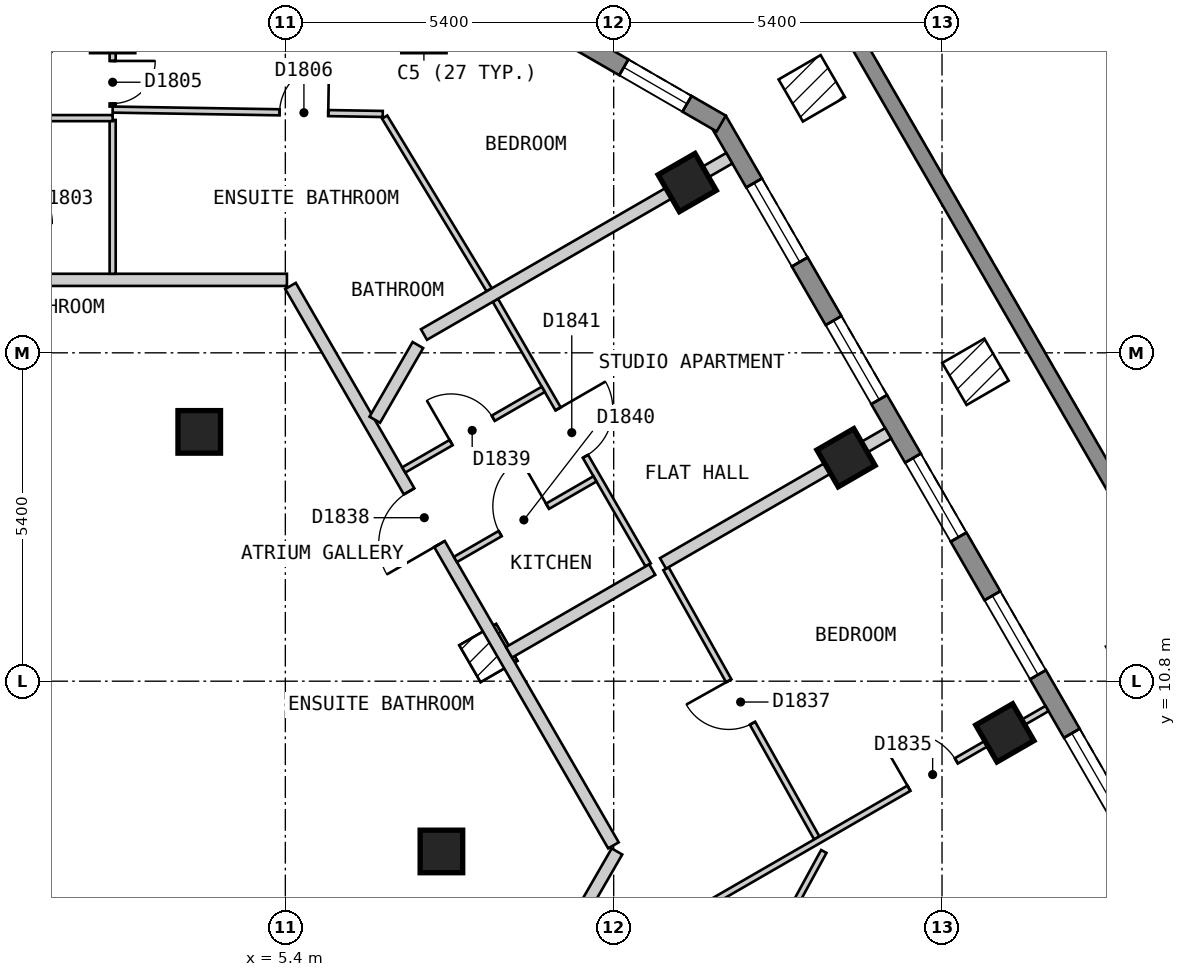
"""IFC4 building model, lengths in metres.
Left out: names, types, materials, properties, quantities, classifications, styles, units other than length and angle.
Written with IfcOpenShell. Run it as: python <this file> out.ifc"""

import sys

from ifc_helpers import new_model, si_unit, direction, frame, frame_2d, origin, origin_2d, place, context, subcontext, project, spatial, polyline, rectangle, outline, extrude, element, fill, save


model = new_model("IFC4")
c1 = context("Model", 3, precision=1e-05, world=origin(), true_north=direction((0.0, 1.0)))
c2 = subcontext(c1, "Body", "Model", "MODEL_VIEW")
j1 = project(units=[si_unit("LENGTHUNIT", "METRE"), si_unit("PLANEANGLEUNIT", "RADIAN")], contexts=[c1])
p1 = place(None, origin())
s1 = spatial("IfcSite", under=j1, at=p1, CompositionType="ELEMENT")
p2 = place(p1, origin())
s2 = spatial("IfcBuilding", under=s1, at=p2, CompositionType="ELEMENT")
p3 = place(p2, frame((0.0, 0.0, 202.8)))
s3 = spatial("IfcBuildingStorey", under=s2, at=p3, CompositionType="ELEMENT", Elevation=202.8)
for number, where, z_axis, x_axis in (
    (1, (17.233, 9.95, 0.0), (0.0, 0.0, 1.0), (-0.5, 0.866, 0.0)),
    (2, (14.621, 14.475, 0.0), (0.0, 0.0, 1.0), (-0.5, 0.866, 0.0)),
    (3, (12.009, 19.0, 0.0), (0.0, 0.0, 1.0), (-0.5, 0.866, 0.0)),
    (4, (7.967, 8.0, 0.0), (0.0, 0.0, 1.0), (1.0, 0.0, 0.0)),
    (5, (3.984, 14.9, 0.0), (0.0, 0.0, 1.0), (1.0, 0.0, 0.0)),
):
    element("IfcColumn", number, at=place(p3, frame(where, z_axis=z_axis, x_axis=x_axis)), inside=s3, PredefinedType="COLUMN", context=c2, shape_type="SweptSolid", body=[
        extrude(rectangle(XDim=0.7, YDim=0.7, at=origin_2d()), origin(), (0.0, 0.0, 1.0), 3.0),
    ])
p4 = place(p3, frame((23.599, 0.825, 0.0), z_axis=(0.0, 0.0, 1.0), x_axis=(-0.500003656944, 0.866023292436, 0.0)))
e6 = element("IfcWall", 6, at=p4, inside=s3, PredefinedType="SOLIDWALL", context=c2, shape_type="SweptSolid", body=[
    extrude(outline(polyline([(0.0, -0.15), (22.17, -0.15), (22.09, 0.15), (0.08, 0.15), (0.0, -0.15)])), origin(), (0.0, 0.0, 1.0), 2.7),
])
p5 = place(p4, frame((1.191, 0.0, 0.15)))
e7 = element("IfcOpeningElement", 7, at=p5, cuts=e6, PredefinedType="OPENING", context=c2, shape_type="SweptSolid", body=[
    extrude(rectangle(XDim=1.5, YDim=2.1, at=frame_2d((0.75, 1.05))), frame((0.0, 0.16, 0.0), z_axis=(0.0, -1.0, 0.0), x_axis=(1.0, 0.0, 0.0)), (0.0, 0.0, 1.0), 0.32),
])
p6 = place(p4, frame((3.804, 0.0, 0.15)))
e8 = element("IfcOpeningElement", 8, at=p6, cuts=e6, PredefinedType="OPENING", context=c2, shape_type="SweptSolid", body=[
    extrude(rectangle(XDim=1.5, YDim=2.1, at=frame_2d((0.75, 1.05))), frame((0.0, 0.16, 0.0), z_axis=(0.0, -1.0, 0.0), x_axis=(1.0, 0.0, 0.0)), (0.0, 0.0, 1.0), 0.32),
])
p7 = place(p4, frame((6.417, 0.0, 0.15)))
e9 = element("IfcOpeningElement", 9, at=p7, cuts=e6, PredefinedType="OPENING", context=c2, shape_type="SweptSolid", body=[
    extrude(rectangle(XDim=1.5, YDim=2.1, at=frame_2d((0.75, 1.05))), frame((0.0, 0.16, 0.0), z_axis=(0.0, -1.0, 0.0), x_axis=(1.0, 0.0, 0.0)), (0.0, 0.0, 1.0), 0.32),
])
p8 = place(p4, frame((9.029, 0.0, 0.15)))
e10 = element("IfcOpeningElement", 10, at=p8, cuts=e6, PredefinedType="OPENING", context=c2, shape_type="SweptSolid", body=[
    extrude(rectangle(XDim=1.5, YDim=2.1, at=frame_2d((0.75, 1.05))), frame((0.0, 0.16, 0.0), z_axis=(0.0, -1.0, 0.0), x_axis=(1.0, 0.0, 0.0)), (0.0, 0.0, 1.0), 0.32),
])
p9 = place(p4, frame((11.641, 0.0, 0.15)))
e11 = element("IfcOpeningElement", 11, at=p9, cuts=e6, PredefinedType="OPENING", context=c2, shape_type="SweptSolid", body=[
    extrude(rectangle(XDim=1.5, YDim=2.1, at=frame_2d((0.75, 1.05))), frame((0.0, 0.16, 0.0), z_axis=(0.0, -1.0, 0.0), x_axis=(1.0, 0.0, 0.0)), (0.0, 0.0, 1.0), 0.32),
])
p10 = place(p4, frame((14.254, 0.0, 0.15)))
e12 = element("IfcOpeningElement", 12, at=p10, cuts=e6, PredefinedType="OPENING", context=c2, shape_type="SweptSolid", body=[
    extrude(rectangle(XDim=1.5, YDim=2.1, at=frame_2d((0.75, 1.05))), frame((0.0, 0.16, 0.0), z_axis=(0.0, -1.0, 0.0), x_axis=(1.0, 0.0, 0.0)), (0.0, 0.0, 1.0), 0.32),
])
p11 = place(p4, frame((16.866, 0.0, 0.15)))
e13 = element("IfcOpeningElement", 13, at=p11, cuts=e6, PredefinedType="OPENING", context=c2, shape_type="SweptSolid", body=[
    extrude(rectangle(XDim=1.5, YDim=2.1, at=frame_2d((0.75, 1.05))), frame((0.0, 0.16, 0.0), z_axis=(0.0, -1.0, 0.0), x_axis=(1.0, 0.0, 0.0)), (0.0, 0.0, 1.0), 0.32),
])
p12 = place(p4, frame((19.479, 0.0, 0.15)))
e14 = element("IfcOpeningElement", 14, at=p12, cuts=e6, PredefinedType="OPENING", context=c2, shape_type="SweptSolid", body=[
    extrude(rectangle(XDim=1.5, YDim=2.1, at=frame_2d((0.75, 1.05))), frame((0.0, 0.16, 0.0), z_axis=(0.0, -1.0, 0.0), x_axis=(1.0, 0.0, 0.0)), (0.0, 0.0, 1.0), 0.32),
])
p13 = place(p3, frame((12.569, 19.97, 0.0), z_axis=(0.0, 0.0, 1.0), x_axis=(-0.866022959057, 0.500004234368, 0.0)))
e15 = element("IfcWall", 15, at=p13, inside=s3, PredefinedType="SOLIDWALL", context=c2, shape_type="SweptSolid", body=[
    extrude(outline(polyline([(0.0, -0.15), (5.0, -0.15), (4.92, 0.15), (0.08, 0.15), (0.0, -0.15)])), origin(), (0.0, 0.0, 1.0), 2.7),
])
p14 = place(p13, frame((0.65, 0.0, 0.15)))
e16 = element("IfcOpeningElement", 16, at=p14, cuts=e15, PredefinedType="OPENING", context=c2, shape_type="SweptSolid", body=[
    extrude(rectangle(XDim=1.2, YDim=2.1, at=frame_2d((0.6, 1.05))), frame((0.0, 0.16, 0.0), z_axis=(0.0, -1.0, 0.0), x_axis=(1.0, 0.0, 0.0)), (0.0, 0.0, 1.0), 0.32),
])
p15 = place(p13, frame((3.15, 0.0, 0.15)))
e17 = element("IfcOpeningElement", 17, at=p15, cuts=e15, PredefinedType="OPENING", context=c2, shape_type="SweptSolid", body=[
    extrude(rectangle(XDim=1.2, YDim=2.1, at=frame_2d((0.6, 1.05))), frame((0.0, 0.16, 0.0), z_axis=(0.0, -1.0, 0.0), x_axis=(1.0, 0.0, 0.0)), (0.0, 0.0, 1.0), 0.32),
])
p16 = place(p3, frame((14.613, 21.637, 0.0), z_axis=(0.0, 0.0, 1.0), x_axis=(0.500061067893, -0.865990143349, 0.0)))
e18 = element("IfcWall", 18, at=p16, inside=s3, PredefinedType="PARAPET", context=c2, shape_type="SweptSolid", body=[
    extrude(outline(polyline([(0.067, -0.125), (22.796, -0.125), (22.863, 0.125), (0.0, 0.125), (0.067, -0.125)])), origin(), (0.0, 0.0, 1.0), 1.6),
])
p17 = place(p3, frame((5.485, 17.3, 0.0), z_axis=(0.0, 0.0, 1.0), x_axis=(0.499943285704, -0.866058145322, 0.0)))
e19 = element("IfcWall", 19, at=p17, inside=s3, PredefinedType="PARTITIONING", context=c2, shape_type="SweptSolid", body=[
    extrude(rectangle(XDim=10.623, YDim=0.2, at=frame_2d((5.312, 0.0))), origin(), (0.0, 0.0, 1.0), 2.7),
])
p18 = place(p17, frame((3.901, 0.0, 0.0)))
e20 = element("IfcOpeningElement", 20, at=p18, cuts=e19, PredefinedType="OPENING", context=c2, shape_type="SweptSolid", body=[
    extrude(rectangle(XDim=1.0, YDim=2.1, at=frame_2d((0.5, 1.05))), frame((0.0, 0.11, 0.0), z_axis=(0.0, -1.0, 0.0), x_axis=(1.0, 0.0, 0.0)), (0.0, 0.0, 1.0), 0.22),
])
p19 = place(p3, frame((-5.311, 17.4, 0.0), z_axis=(0.0, 0.0, 1.0), x_axis=(1.0, 0.0, 0.0)))
e21 = element("IfcWall", 21, at=p19, inside=s3, PredefinedType="PARTITIONING", context=c2, shape_type="SweptSolid", body=[
    extrude(rectangle(XDim=10.737, YDim=0.2, at=frame_2d((5.369, 0.0))), origin(), (0.0, 0.0, 1.0), 2.7),
])
p20 = place(p19, frame((4.812, 0.0, 0.0)))
e22 = element("IfcOpeningElement", 22, at=p20, cuts=e21, PredefinedType="OPENING", context=c2, shape_type="SweptSolid", body=[
    extrude(rectangle(XDim=1.0, YDim=2.1, at=frame_2d((0.5, 1.05))), frame((0.0, 0.11, 0.0), z_axis=(0.0, -1.0, 0.0), x_axis=(1.0, 0.0, 0.0)), (0.0, 0.0, 1.0), 0.22),
])
p21 = place(p3, frame((9.404, 5.487, 0.0), z_axis=(0.0, 0.0, 1.0), x_axis=(0.499768590677, 0.866158966803, 0.0)))
e23 = element("IfcWall", 23, at=p21, inside=s3, PredefinedType="PARTITIONING", context=c2, shape_type="SweptSolid", body=[
    extrude(rectangle(XDim=2.901, YDim=0.2, at=frame_2d((1.451, 0.0))), origin(), (0.0, 0.0, 1.0), 2.7),
])
p22 = place(p3, frame((7.033, 20.077, 0.0), z_axis=(0.0, 0.0, 1.0), x_axis=(0.517918779664, -0.855429797044, 0.0)))
e24 = element("IfcWall", 24, at=p22, inside=s3, PredefinedType="PARTITIONING", context=c2, shape_type="SweptSolid", body=[
    extrude(rectangle(XDim=3.321, YDim=0.1, at=frame_2d((1.661, 0.0))), origin(), (0.0, 0.0, 1.0), 2.7),
])
p23 = place(p3, frame((8.854, 17.064, 0.0), z_axis=(0.0, 0.0, 1.0), x_axis=(0.500042049778, -0.866001124973, 0.0)))
e25 = element("IfcWall", 25, at=p23, inside=s3, PredefinedType="PARTITIONING", context=c2, shape_type="SweptSolid", body=[
    extrude(rectangle(XDim=5.025, YDim=0.1, at=frame_2d((2.513, 0.0))), origin(), (0.0, 0.0, 1.0), 2.7),
])
p24 = place(p23, frame((2.063, 0.0, 0.0)))
e26 = element("IfcOpeningElement", 26, at=p24, cuts=e25, PredefinedType="OPENING", context=c2, shape_type="SweptSolid", body=[
    extrude(rectangle(XDim=0.9, YDim=2.1, at=frame_2d((0.45, 1.05))), frame((0.0, 0.06, 0.0), z_axis=(0.0, -1.0, 0.0), x_axis=(1.0, 0.0, 0.0)), (0.0, 0.0, 1.0), 0.12),
])
p25 = place(p3, frame((11.66, 12.65, 0.0), z_axis=(0.0, 0.0, 1.0), x_axis=(0.488650242737, -0.872479764965, 0.0)))
e27 = element("IfcWall", 27, at=p25, inside=s3, PredefinedType="PARTITIONING", context=c2, shape_type="SweptSolid", body=[
    extrude(rectangle(XDim=5.075, YDim=0.1, at=frame_2d((2.538, 0.0))), origin(), (0.0, 0.0, 1.0), 2.7),
])
p26 = place(p25, frame((2.113, 0.0, 0.0)))
e28 = element("IfcOpeningElement", 28, at=p26, cuts=e27, PredefinedType="OPENING", context=c2, shape_type="SweptSolid", body=[
    extrude(rectangle(XDim=0.8, YDim=2.1, at=frame_2d((0.4, 1.05))), frame((0.0, 0.06, 0.0), z_axis=(0.0, -1.0, 0.0), x_axis=(1.0, 0.0, 0.0)), (0.0, 0.0, 1.0), 0.12),
])
p27 = place(p3, frame((2.56, 22.3, 0.0), z_axis=(0.0, 0.0, 1.0), x_axis=(0.0, -1.0, 0.0)))
e29 = element("IfcWall", 29, at=p27, inside=s3, PredefinedType="PARTITIONING", context=c2, shape_type="SweptSolid", body=[
    extrude(rectangle(XDim=2.05, YDim=0.1, at=frame_2d((1.025, 0.0))), origin(), (0.0, 0.0, 1.0), 2.7),
])
p28 = place(p27, frame((1.3, 0.0, 0.0)))
e30 = element("IfcOpeningElement", 30, at=p28, cuts=e29, PredefinedType="OPENING", context=c2, shape_type="SweptSolid", body=[
    extrude(rectangle(XDim=0.7, YDim=2.1, at=frame_2d((0.35, 1.05))), frame((0.0, 0.06, 0.0), z_axis=(0.0, -1.0, 0.0), x_axis=(1.0, 0.0, 0.0)), (0.0, 0.0, 1.0), 0.12),
])
p29 = place(p3, frame((2.56, 20.03, 0.0), z_axis=(0.0, 0.0, 1.0), x_axis=(0.0, -1.0, 0.0)))
e31 = element("IfcWall", 31, at=p29, inside=s3, PredefinedType="PARTITIONING", context=c2, shape_type="SweptSolid", body=[
    extrude(rectangle(XDim=2.53, YDim=0.1, at=frame_2d((1.265, 0.0))), origin(), (0.0, 0.0, 1.0), 2.7),
])
p30 = place(p3, frame((2.56, 20.2, 0.0), z_axis=(0.0, 0.0, 1.0), x_axis=(0.999868576801, -0.016212005615, 0.0)))
e32 = element("IfcWall", 32, at=p30, inside=s3, PredefinedType="PARTITIONING", context=c2, shape_type="SweptSolid", body=[
    extrude(rectangle(XDim=4.442, YDim=0.1, at=frame_2d((2.221, 0.0))), origin(), (0.0, 0.0, 1.0), 2.7),
])
p31 = place(p30, frame((2.746, 0.0, 0.0)))
e33 = element("IfcOpeningElement", 33, at=p31, cuts=e32, PredefinedType="OPENING", context=c2, shape_type="SweptSolid", body=[
    extrude(rectangle(XDim=0.8, YDim=2.1, at=frame_2d((0.4, 1.05))), frame((0.0, 0.06, 0.0), z_axis=(0.0, -1.0, 0.0), x_axis=(1.0, 0.0, 0.0)), (0.0, 0.0, 1.0), 0.12),
])
p32 = place(p3, frame((-0.716, 20.06, 0.0), z_axis=(0.0, 0.0, 1.0), x_axis=(1.0, 0.0, 0.0)))
e34 = element("IfcWall", 34, at=p32, inside=s3, PredefinedType="PARTITIONING", context=c2, shape_type="SweptSolid", body=[
    extrude(rectangle(XDim=3.276, YDim=0.1, at=frame_2d((1.638, 0.0))), origin(), (0.0, 0.0, 1.0), 2.7),
])
p33 = place(p3, frame((12.729, 5.201, 0.0), z_axis=(0.0, 0.0, 1.0), x_axis=(0.478932598182, 0.877851676764, 0.0)))
e35 = element("IfcWall", 35, at=p33, inside=s3, PredefinedType="PARTITIONING", context=c2, shape_type="SweptSolid", body=[
    extrude(rectangle(XDim=3.188, YDim=0.1, at=frame_2d((1.594, 0.0))), origin(), (0.0, 0.0, 1.0), 2.7),
])
p34 = place(p3, frame((9.354, 5.401, 0.0), z_axis=(0.0, 0.0, 1.0), x_axis=(0.866018411306, 0.500012111133, 0.0)))
e36 = element("IfcWall", 36, at=p34, inside=s3, PredefinedType="PARTITIONING", context=c2, shape_type="SweptSolid", body=[
    extrude(rectangle(XDim=9.898, YDim=0.1, at=frame_2d((4.949, 0.0))), origin(), (0.0, 0.0, 1.0), 2.7),
])
p35 = place(p34, frame((7.277, 0.0, 0.0)))
e37 = element("IfcOpeningElement", 37, at=p35, cuts=e36, PredefinedType="OPENING", context=c2, shape_type="SweptSolid", body=[
    extrude(rectangle(XDim=0.9, YDim=2.1, at=frame_2d((0.45, 1.05))), frame((0.0, 0.06, 0.0), z_axis=(0.0, -1.0, 0.0), x_axis=(1.0, 0.0, 0.0)), (0.0, 0.0, 1.0), 0.12),
])
p36 = place(p3, frame((8.197, 12.802, 0.0), z_axis=(0.0, 0.0, 1.0), x_axis=(0.866029095148, 0.499993606316, 0.0)))
e38 = element("IfcWall", 38, at=p36, inside=s3, PredefinedType="PARTITIONING", context=c2, shape_type="SweptSolid", body=[
    extrude(rectangle(XDim=2.65, YDim=0.1, at=frame_2d((1.325, 0.0))), origin(), (0.0, 0.0, 1.0), 2.7),
])
p37 = place(p36, frame((0.85, 0.0, 0.0)))
e39 = element("IfcOpeningElement", 39, at=p37, cuts=e38, PredefinedType="OPENING", context=c2, shape_type="SweptSolid", body=[
    extrude(rectangle(XDim=0.9, YDim=2.1, at=frame_2d((0.45, 1.05))), frame((0.0, 0.06, 0.0), z_axis=(0.0, -1.0, 0.0), x_axis=(1.0, 0.0, 0.0)), (0.0, 0.0, 1.0), 0.12),
])
p38 = place(p3, frame((7.347, 14.274, 0.0), z_axis=(0.0, 0.0, 1.0), x_axis=(0.86601223543, 0.500022807565, 0.0)))
e40 = element("IfcWall", 40, at=p38, inside=s3, PredefinedType="PARTITIONING", context=c2, shape_type="SweptSolid", body=[
    extrude(rectangle(XDim=2.65, YDim=0.1, at=frame_2d((1.325, 0.0))), origin(), (0.0, 0.0, 1.0), 2.7),
])
p39 = place(p38, frame((0.9, 0.0, 0.0)))
e41 = element("IfcOpeningElement", 41, at=p39, cuts=e40, PredefinedType="OPENING", context=c2, shape_type="SweptSolid", body=[
    extrude(rectangle(XDim=0.8, YDim=2.1, at=frame_2d((0.4, 1.05))), frame((0.0, 0.06, 0.0), z_axis=(0.0, -1.0, 0.0), x_axis=(1.0, 0.0, 0.0)), (0.0, 0.0, 1.0), 0.12),
])
p40 = place(p3, frame((6.871, 15.1, 0.0), z_axis=(0.0, 0.0, 1.0), x_axis=(0.50006528296, 0.865987709369, 0.0)))
e42 = element("IfcWall", 42, at=p40, inside=s3, PredefinedType="PARTITIONING", context=c2, shape_type="SweptSolid", body=[
    extrude(rectangle(XDim=1.418, YDim=0.2, at=frame_2d((0.709, 0.0))), origin(), (0.0, 0.0, 1.0), 2.7),
])
p41 = place(p3, frame((9.079, 11.275, 0.0), z_axis=(0.0, 0.0, 1.0), x_axis=(0.865952340496, 0.500126527981, 0.0)))
e43 = element("IfcWall", 43, at=p41, inside=s3, PredefinedType="PARTITIONING", context=c2, shape_type="SweptSolid", body=[
    extrude(rectangle(XDim=2.719, YDim=0.2, at=frame_2d((1.36, 0.0))), origin(), (0.0, 0.0, 1.0), 2.7),
])
p42 = place(p3, frame((11.611, 12.737, 0.0), z_axis=(0.0, 0.0, 1.0), x_axis=(0.866017282483, 0.500014066243, 0.0)))
e44 = element("IfcWall", 44, at=p42, inside=s3, PredefinedType="PARTITIONING", context=c2, shape_type="SweptSolid", body=[
    extrude(rectangle(XDim=4.276, YDim=0.2, at=frame_2d((2.138, 0.0))), origin(), (0.0, 0.0, 1.0), 2.7),
])
p43 = place(p3, frame((7.68, 16.501, 0.0), z_axis=(0.0, 0.0, 1.0), x_axis=(0.86602149507, 0.500006770031, 0.0)))
e45 = element("IfcWall", 45, at=p43, inside=s3, PredefinedType="PARTITIONING", context=c2, shape_type="SweptSolid", body=[
    extrude(rectangle(XDim=5.798, YDim=0.2, at=frame_2d((2.899, 0.0))), origin(), (0.0, 0.0, 1.0), 2.7),
])
p44 = place(p8, origin())
e46 = element("IfcWindow", 46, at=p44, inside=s3, PartitioningType="SINGLE_PANEL", PredefinedType="WINDOW", context=c2, shape_type="SweptSolid", body=[
    extrude(rectangle(XDim=1.5, YDim=2.1, at=frame_2d((0.75, 1.05))), frame((0.0, 0.03, 0.0), z_axis=(0.0, -1.0, 0.0), x_axis=(1.0, 0.0, 0.0)), (0.0, 0.0, 1.0), 0.06),
])
fill(e10, e46)
p45 = place(p9, origin())
e47 = element("IfcWindow", 47, at=p45, inside=s3, PartitioningType="SINGLE_PANEL", PredefinedType="WINDOW", context=c2, shape_type="SweptSolid", body=[
    extrude(rectangle(XDim=1.5, YDim=2.1, at=frame_2d((0.75, 1.05))), frame((0.0, 0.03, 0.0), z_axis=(0.0, -1.0, 0.0), x_axis=(1.0, 0.0, 0.0)), (0.0, 0.0, 1.0), 0.06),
])
fill(e11, e47)
p46 = place(p10, origin())
e48 = element("IfcWindow", 48, at=p46, inside=s3, PartitioningType="SINGLE_PANEL", PredefinedType="WINDOW", context=c2, shape_type="SweptSolid", body=[
    extrude(rectangle(XDim=1.5, YDim=2.1, at=frame_2d((0.75, 1.05))), frame((0.0, 0.03, 0.0), z_axis=(0.0, -1.0, 0.0), x_axis=(1.0, 0.0, 0.0)), (0.0, 0.0, 1.0), 0.06),
])
fill(e12, e48)
p47 = place(p11, origin())
e49 = element("IfcWindow", 49, at=p47, inside=s3, PartitioningType="SINGLE_PANEL", PredefinedType="WINDOW", context=c2, shape_type="SweptSolid", body=[
    extrude(rectangle(XDim=1.5, YDim=2.1, at=frame_2d((0.75, 1.05))), frame((0.0, 0.03, 0.0), z_axis=(0.0, -1.0, 0.0), x_axis=(1.0, 0.0, 0.0)), (0.0, 0.0, 1.0), 0.06),
])
fill(e13, e49)
p48 = place(p12, origin())
e50 = element("IfcWindow", 50, at=p48, inside=s3, PartitioningType="SINGLE_PANEL", PredefinedType="WINDOW", context=c2, shape_type="SweptSolid", body=[
    extrude(rectangle(XDim=1.5, YDim=2.1, at=frame_2d((0.75, 1.05))), frame((0.0, 0.03, 0.0), z_axis=(0.0, -1.0, 0.0), x_axis=(1.0, 0.0, 0.0)), (0.0, 0.0, 1.0), 0.06),
])
fill(e14, e50)
p49 = place(p14, origin())
e51 = element("IfcWindow", 51, at=p49, inside=s3, PartitioningType="SINGLE_PANEL", PredefinedType="WINDOW", context=c2, shape_type="SweptSolid", body=[
    extrude(rectangle(XDim=1.2, YDim=2.1, at=frame_2d((0.6, 1.05))), frame((0.0, 0.03, 0.0), z_axis=(0.0, -1.0, 0.0), x_axis=(1.0, 0.0, 0.0)), (0.0, 0.0, 1.0), 0.06),
])
fill(e16, e51)
p50 = place(p28, origin())
e52 = element("IfcDoor", 52, at=p50, inside=s3, OperationType="SINGLE_SWING_LEFT", PredefinedType="DOOR", context=c2, shape_type="SweptSolid", body=[
    extrude(rectangle(XDim=0.7, YDim=2.1, at=frame_2d((0.35, 1.05))), frame((0.0, 0.025, 0.0), z_axis=(0.0, -1.0, 0.0), x_axis=(1.0, 0.0, 0.0)), (0.0, 0.0, 1.0), 0.05),
])
fill(e30, e52)
p51 = place(p31, origin())
e53 = element("IfcDoor", 53, at=p51, inside=s3, OperationType="SINGLE_SWING_RIGHT", PredefinedType="DOOR", context=c2, shape_type="SweptSolid", body=[
    extrude(rectangle(XDim=0.8, YDim=2.1, at=frame_2d((0.4, 1.05))), frame((0.0, 0.025, 0.0), z_axis=(0.0, -1.0, 0.0), x_axis=(1.0, 0.0, 0.0)), (0.0, 0.0, 1.0), 0.05),
])
fill(e33, e53)
p52 = place(p35, origin())
e54 = element("IfcDoor", 54, at=p52, inside=s3, OperationType="SINGLE_SWING_LEFT", PredefinedType="DOOR", context=c2, shape_type="SweptSolid", body=[
    extrude(rectangle(XDim=0.9, YDim=2.1, at=frame_2d((0.45, 1.05))), frame((0.0, 0.025, 0.0), z_axis=(0.0, -1.0, 0.0), x_axis=(1.0, 0.0, 0.0)), (0.0, 0.0, 1.0), 0.05),
])
fill(e37, e54)
p53 = place(p26, origin())
e55 = element("IfcDoor", 55, at=p53, inside=s3, OperationType="SINGLE_SWING_LEFT", PredefinedType="DOOR", context=c2, shape_type="SweptSolid", body=[
    extrude(rectangle(XDim=0.8, YDim=2.1, at=frame_2d((0.4, 1.05))), frame((0.0, 0.025, 0.0), z_axis=(0.0, -1.0, 0.0), x_axis=(1.0, 0.0, 0.0)), (0.0, 0.0, 1.0), 0.05),
])
fill(e28, e55)
p54 = place(p18, origin())
e56 = element("IfcDoor", 56, at=p54, inside=s3, OperationType="SINGLE_SWING_RIGHT", PredefinedType="DOOR", context=c2, shape_type="SweptSolid", body=[
    extrude(rectangle(XDim=1.0, YDim=2.1, at=frame_2d((0.5, 1.05))), frame((0.0, 0.025, 0.0), z_axis=(0.0, -1.0, 0.0), x_axis=(1.0, 0.0, 0.0)), (0.0, 0.0, 1.0), 0.05),
])
fill(e20, e56)
p55 = place(p39, origin())
e57 = element("IfcDoor", 57, at=p55, inside=s3, OperationType="SINGLE_SWING_LEFT", PredefinedType="DOOR", context=c2, shape_type="SweptSolid", body=[
    extrude(rectangle(XDim=0.8, YDim=2.1, at=frame_2d((0.4, 1.05))), frame((0.0, 0.025, 0.0), z_axis=(0.0, -1.0, 0.0), x_axis=(1.0, 0.0, 0.0)), (0.0, 0.0, 1.0), 0.05),
])
fill(e41, e57)
p56 = place(p37, origin())
e58 = element("IfcDoor", 58, at=p56, inside=s3, OperationType="SINGLE_SWING_RIGHT", PredefinedType="DOOR", context=c2, shape_type="SweptSolid", body=[
    extrude(rectangle(XDim=0.9, YDim=2.1, at=frame_2d((0.45, 1.05))), frame((0.0, 0.025, 0.0), z_axis=(0.0, -1.0, 0.0), x_axis=(1.0, 0.0, 0.0)), (0.0, 0.0, 1.0), 0.05),
])
fill(e39, e58)
p57 = place(p24, origin())
e59 = element("IfcDoor", 59, at=p57, inside=s3, OperationType="SINGLE_SWING_LEFT", PredefinedType="DOOR", context=c2, shape_type="SweptSolid", body=[
    extrude(rectangle(XDim=0.9, YDim=2.1, at=frame_2d((0.45, 1.05))), frame((0.0, 0.025, 0.0), z_axis=(0.0, -1.0, 0.0), x_axis=(1.0, 0.0, 0.0)), (0.0, 0.0, 1.0), 0.05),
])
fill(e26, e59)
save(model, sys.argv[1])
